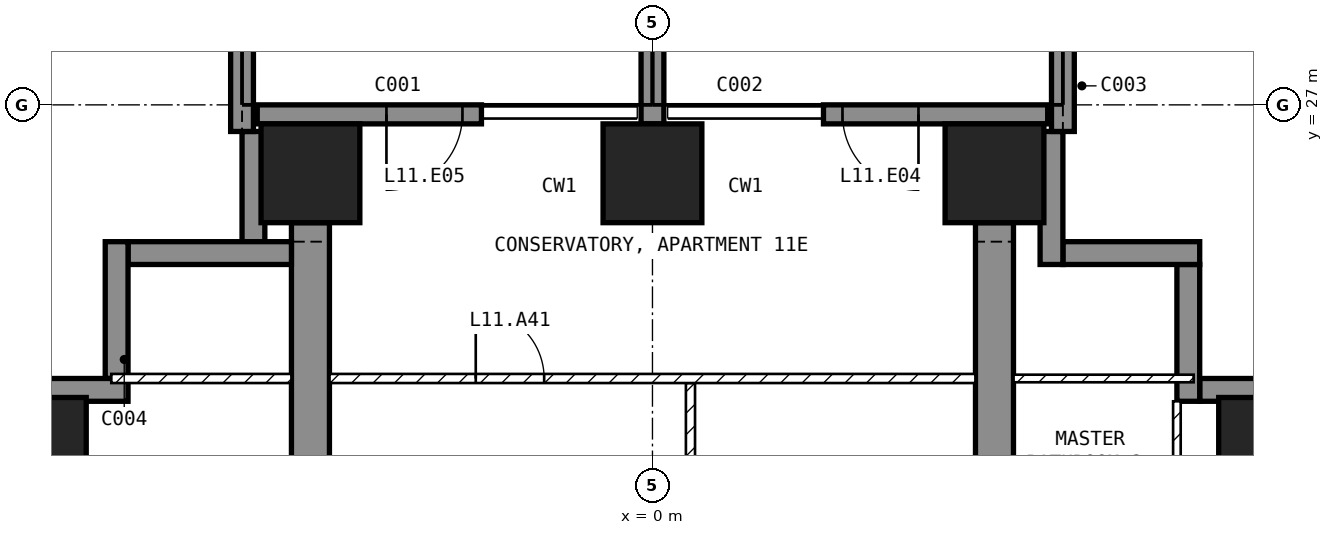
"""IFC4 building model, lengths in metres.
Left out: names, types, materials, properties, quantities, classifications, styles, units other than length and angle.
Written with IfcOpenShell. Run it as: python <this file> out.ifc"""

import sys

from ifc_helpers import new_model, si_unit, direction, frame, frame_2d, origin, origin_2d, place, context, subcontext, project, spatial, polyline, rectangle, outline, extrude, element, fill, save


model = new_model("IFC4")
c1 = context("Model", 3, precision=1e-05, world=origin(), true_north=direction((0.0, 1.0)))
c2 = subcontext(c1, "Body", "Model", "MODEL_VIEW")
j1 = project(units=[si_unit("LENGTHUNIT", "METRE"), si_unit("PLANEANGLEUNIT", "RADIAN")], contexts=[c1])
p1 = place(None, origin())
s1 = spatial("IfcSite", under=j1, at=p1, CompositionType="ELEMENT")
p2 = place(p1, origin())
s2 = spatial("IfcBuilding", under=s1, at=p2, CompositionType="ELEMENT")
p3 = place(p2, frame((0.0, 0.0, 57.5)))
s3 = spatial("IfcBuildingStorey", under=s2, at=p3, CompositionType="ELEMENT", Elevation=57.5)
for number, where, z_axis, x_axis in (
    (1, (-8.1, 22.5, -0.25), (0.0, 0.0, 1.0), (1.0, 0.0, 0.0)),
    (2, (-4.5, 26.1, -0.25), (0.0, 0.0, 1.0), (1.0, 0.0, 0.0)),
    (3, (0.0, 26.1, -0.25), (0.0, 0.0, 1.0), (1.0, 0.0, 0.0)),
    (4, (4.5, 26.1, -0.25), (0.0, 0.0, 1.0), (1.0, 0.0, 0.0)),
    (5, (8.1, 22.5, -0.25), (0.0, 0.0, 1.0), (1.0, 0.0, 0.0)),
):
    element("IfcColumn", number, at=place(p3, frame(where, z_axis=z_axis, x_axis=x_axis)), inside=s3, PredefinedType="COLUMN", context=c2, shape_type="SweptSolid", body=[
        extrude(rectangle(XDim=1.3, YDim=1.3, at=origin_2d()), origin(), (0.0, 0.0, 1.0), 3.5),
    ])
for number, where, z_axis, x_axis in (
    (6, (-4.75, 9.0, -0.25), (1.0, 0.0, 0.0), (0.0, 1.0, 0.0)),
    (7, (4.25, 9.0, -0.25), (1.0, 0.0, 0.0), (0.0, 1.0, 0.0)),
):
    element("IfcWall", number, at=place(p3, frame(where, z_axis=z_axis, x_axis=x_axis)), inside=s3, PredefinedType="SHEAR", context=c2, shape_type="SweptSolid", body=[
        extrude(outline(polyline([(0.0, 0.0), (2.1, 0.0), (2.1, 2.65), (4.5, 2.65), (4.5, 0.0), (9.9, 0.0), (9.9, 2.65), (12.3, 2.65), (12.3, 0.0), (16.45, 0.0), (16.45, 3.5), (0.0, 3.5), (0.0, 0.0)])), origin(), (0.0, 0.0, 1.0), 0.5),
    ])
p4 = place(p3, frame((5.2, 26.875, 0.0), z_axis=(0.0, 0.0, 1.0), x_axis=(-1.0, 0.0, 0.0)))
e8 = element("IfcWall", 8, at=p4, inside=s3, PredefinedType="SOLIDWALL", context=c2, shape_type="SweptSolid", body=[
    extrude(rectangle(XDim=2.95, YDim=0.25, at=frame_2d((1.475, 0.0))), origin(), (0.0, 0.0, 1.0), 3.25),
])
p5 = place(p4, frame((1.7, 0.0, 0.0)))
e9 = element("IfcOpeningElement", 9, at=p5, cuts=e8, PredefinedType="OPENING", context=c2, shape_type="SweptSolid", body=[
    extrude(rectangle(XDim=1.0, YDim=2.4, at=frame_2d((0.5, 1.2))), frame((0.0, 0.135, 0.0), z_axis=(0.0, -1.0, 0.0), x_axis=(1.0, 0.0, 0.0)), (0.0, 0.0, 1.0), 0.27),
])
p6 = place(p3, frame((-2.25, 26.875, 0.0), z_axis=(0.0, 0.0, 1.0), x_axis=(-1.0, 0.0, 0.0)))
e10 = element("IfcWall", 10, at=p6, inside=s3, PredefinedType="SOLIDWALL", context=c2, shape_type="SweptSolid", body=[
    extrude(rectangle(XDim=2.95, YDim=0.25, at=frame_2d((1.475, 0.0))), origin(), (0.0, 0.0, 1.0), 3.25),
])
p7 = place(p6, frame((0.25, 0.0, 0.0)))
e11 = element("IfcOpeningElement", 11, at=p7, cuts=e10, PredefinedType="OPENING", context=c2, shape_type="SweptSolid", body=[
    extrude(rectangle(XDim=1.0, YDim=2.4, at=frame_2d((0.5, 1.2))), frame((0.0, 0.135, 0.0), z_axis=(0.0, -1.0, 0.0), x_axis=(1.0, 0.0, 0.0)), (0.0, 0.0, 1.0), 0.27),
])
p8 = place(p3, frame((8.65, 23.25, 0.0), z_axis=(0.0, 0.0, 1.0), x_axis=(-1.0, 0.0, 0.0)))
e12 = element("IfcWall", 12, at=p8, inside=s3, PredefinedType="SOLIDWALL", context=c2, shape_type="SweptSolid", body=[
    extrude(rectangle(XDim=1.45, YDim=0.3, at=frame_2d((0.725, 0.0))), origin(), (0.0, 0.0, 1.0), 3.25),
])
p9 = place(p3, frame((7.05, 23.1, 0.0), z_axis=(0.0, 0.0, 1.0), x_axis=(0.0, 1.0, 0.0)))
e13 = element("IfcWall", 13, at=p9, inside=s3, PredefinedType="SOLIDWALL", context=c2, shape_type="SweptSolid", body=[
    extrude(rectangle(XDim=1.8, YDim=0.3, at=frame_2d((0.9, 0.0))), origin(), (0.0, 0.0, 1.0), 3.25),
])
p10 = place(p3, frame((7.2, 25.05, 0.0), z_axis=(0.0, 0.0, 1.0), x_axis=(-1.0, 0.0, 0.0)))
e14 = element("IfcWall", 14, at=p10, inside=s3, PredefinedType="SOLIDWALL", context=c2, shape_type="SweptSolid", body=[
    extrude(rectangle(XDim=1.8, YDim=0.3, at=frame_2d((0.9, 0.0))), origin(), (0.0, 0.0, 1.0), 3.25),
])
p11 = place(p3, frame((5.25, 24.9, 0.0), z_axis=(0.0, 0.0, 1.0), x_axis=(0.0, 1.0, 0.0)))
e15 = element("IfcWall", 15, at=p11, inside=s3, PredefinedType="SOLIDWALL", context=c2, shape_type="SweptSolid", body=[
    extrude(rectangle(XDim=1.75, YDim=0.3, at=frame_2d((0.875, 0.0))), origin(), (0.0, 0.0, 1.0), 3.25),
])
p12 = place(p3, frame((-5.25, 26.65, 0.0), z_axis=(0.0, 0.0, 1.0), x_axis=(0.0, -1.0, 0.0)))
e16 = element("IfcWall", 16, at=p12, inside=s3, PredefinedType="SOLIDWALL", context=c2, shape_type="SweptSolid", body=[
    extrude(rectangle(XDim=1.45, YDim=0.3, at=frame_2d((0.725, 0.0))), origin(), (0.0, 0.0, 1.0), 3.25),
])
p13 = place(p3, frame((-4.75, 25.05, 0.0), z_axis=(0.0, 0.0, 1.0), x_axis=(-1.0, 0.0, 0.0)))
e17 = element("IfcWall", 17, at=p13, inside=s3, PredefinedType="SOLIDWALL", context=c2, shape_type="SweptSolid", body=[
    extrude(rectangle(XDim=2.15, YDim=0.3, at=frame_2d((1.075, 0.0))), origin(), (0.0, 0.0, 1.0), 3.25),
])
p14 = place(p3, frame((-7.05, 25.2, 0.0), z_axis=(0.0, 0.0, 1.0), x_axis=(0.0, -1.0, 0.0)))
e18 = element("IfcWall", 18, at=p14, inside=s3, PredefinedType="SOLIDWALL", context=c2, shape_type="SweptSolid", body=[
    extrude(rectangle(XDim=1.8, YDim=0.3, at=frame_2d((0.9, 0.0))), origin(), (0.0, 0.0, 1.0), 3.25),
])
p15 = place(p3, frame((-6.9, 23.25, 0.0), z_axis=(0.0, 0.0, 1.0), x_axis=(-1.0, 0.0, 0.0)))
e19 = element("IfcWall", 19, at=p15, inside=s3, PredefinedType="SOLIDWALL", context=c2, shape_type="SweptSolid", body=[
    extrude(rectangle(XDim=1.75, YDim=0.3, at=frame_2d((0.875, 0.0))), origin(), (0.0, 0.0, 1.0), 3.25),
])
p16 = place(p3, frame((-5.4, 26.65, 0.0), z_axis=(0.0, 0.0, 1.0), x_axis=(0.0, 1.0, 0.0)))
e20 = element("IfcWall", 20, at=p16, inside=s3, PredefinedType="SOLIDWALL", context=c2, shape_type="SweptSolid", body=[
    extrude(rectangle(XDim=3.05, YDim=0.3, at=frame_2d((1.525, 0.0))), origin(), (0.0, 0.0, 1.0), 3.25),
])
p17 = place(p3, frame((0.0, 26.75, 0.0), z_axis=(0.0, 0.0, 1.0), x_axis=(0.0, 1.0, 0.0)))
e21 = element("IfcWall", 21, at=p17, inside=s3, PredefinedType="SOLIDWALL", context=c2, shape_type="SweptSolid", body=[
    extrude(rectangle(XDim=2.95, YDim=0.3, at=frame_2d((1.475, 0.0))), origin(), (0.0, 0.0, 1.0), 3.25),
])
p18 = place(p3, frame((5.4, 26.65, 0.0), z_axis=(0.0, 0.0, 1.0), x_axis=(0.0, 1.0, 0.0)))
e22 = element("IfcWall", 22, at=p18, inside=s3, PredefinedType="SOLIDWALL", context=c2, shape_type="SweptSolid", body=[
    extrude(rectangle(XDim=3.05, YDim=0.3, at=frame_2d((1.525, 0.0))), origin(), (0.0, 0.0, 1.0), 3.25),
])
p19 = place(p3, frame((0.5, 23.34, 0.0), z_axis=(0.0, 0.0, 1.0), x_axis=(0.0, -1.0, 0.0)))
e23 = element("IfcWall", 23, at=p19, inside=s3, PredefinedType="PARTITIONING", context=c2, shape_type="SweptSolid", body=[
    extrude(rectangle(XDim=4.38, YDim=0.12, at=frame_2d((2.19, 0.0))), origin(), (0.0, 0.0, 1.0), 3.25),
])
p20 = place(p19, frame((1.74, 0.0, 0.0)))
e24 = element("IfcOpeningElement", 24, at=p20, cuts=e23, PredefinedType="OPENING", context=c2, shape_type="SweptSolid", body=[
    extrude(rectangle(XDim=0.9, YDim=2.1, at=frame_2d((0.45, 1.05))), frame((0.0, 0.07, 0.0), z_axis=(0.0, -1.0, 0.0), x_axis=(1.0, 0.0, 0.0)), (0.0, 0.0, 1.0), 0.14),
])
p21 = place(p3, frame((-4.25, 23.4, 0.0), z_axis=(0.0, 0.0, 1.0), x_axis=(1.0, 0.0, 0.0)))
e25 = element("IfcWall", 25, at=p21, inside=s3, PredefinedType="PARTITIONING", context=c2, shape_type="SweptSolid", body=[
    extrude(rectangle(XDim=8.5, YDim=0.12, at=frame_2d((4.25, 0.0))), origin(), (0.0, 0.0, 1.0), 3.25),
])
p22 = place(p21, frame((1.925, 0.0, 0.0)))
e26 = element("IfcOpeningElement", 26, at=p22, cuts=e25, PredefinedType="OPENING", context=c2, shape_type="SweptSolid", body=[
    extrude(rectangle(XDim=0.9, YDim=2.1, at=frame_2d((0.45, 1.05))), frame((0.0, 0.07, 0.0), z_axis=(0.0, -1.0, 0.0), x_axis=(1.0, 0.0, 0.0)), (0.0, 0.0, 1.0), 0.14),
])
p23 = place(p3, frame((6.9, 20.45, 0.0), z_axis=(0.0, 0.0, 1.0), x_axis=(0.0, 1.0, 0.0)))
e27 = element("IfcWall", 27, at=p23, inside=s3, PredefinedType="PARTITIONING", context=c2, shape_type="SweptSolid", body=[
    extrude(rectangle(XDim=2.65, YDim=0.1, at=frame_2d((1.325, 0.0))), origin(), (0.0, 0.0, 1.0), 3.25),
])
p24 = place(p3, frame((4.75, 23.4, 0.0), z_axis=(0.0, 0.0, 1.0), x_axis=(1.0, 0.0, 0.0)))
e28 = element("IfcWall", 28, at=p24, inside=s3, PredefinedType="PARTITIONING", context=c2, shape_type="SweptSolid", body=[
    extrude(rectangle(XDim=2.37, YDim=0.1, at=frame_2d((1.185, 0.0))), origin(), (0.0, 0.0, 1.0), 3.25),
])
p25 = place(p3, frame((-7.12, 23.4, 0.0), z_axis=(0.0, 0.0, 1.0), x_axis=(1.0, 0.0, 0.0)))
e29 = element("IfcWall", 29, at=p25, inside=s3, PredefinedType="PARTITIONING", context=c2, shape_type="SweptSolid", body=[
    extrude(rectangle(XDim=2.37, YDim=0.12, at=frame_2d((1.185, 0.0))), origin(), (0.0, 0.0, 1.0), 3.25),
])
p26 = place(p5, origin())
e30 = element("IfcDoor", 30, at=p26, inside=s3, OperationType="SINGLE_SWING_LEFT", PredefinedType="DOOR", context=c2, shape_type="SweptSolid", body=[
    extrude(rectangle(XDim=1.0, YDim=2.4, at=frame_2d((0.5, 1.2))), frame((0.0, 0.025, 0.0), z_axis=(0.0, -1.0, 0.0), x_axis=(1.0, 0.0, 0.0)), (0.0, 0.0, 1.0), 0.05),
])
fill(e9, e30)
p27 = place(p7, origin())
e31 = element("IfcDoor", 31, at=p27, inside=s3, OperationType="SINGLE_SWING_RIGHT", PredefinedType="DOOR", context=c2, shape_type="SweptSolid", body=[
    extrude(rectangle(XDim=1.0, YDim=2.4, at=frame_2d((0.5, 1.2))), frame((0.0, 0.025, 0.0), z_axis=(0.0, -1.0, 0.0), x_axis=(1.0, 0.0, 0.0)), (0.0, 0.0, 1.0), 0.05),
])
fill(e11, e31)
p28 = place(p22, origin())
e32 = element("IfcDoor", 32, at=p28, inside=s3, OperationType="SINGLE_SWING_LEFT", PredefinedType="DOOR", context=c2, shape_type="SweptSolid", body=[
    extrude(rectangle(XDim=0.9, YDim=2.1, at=frame_2d((0.45, 1.05))), frame((0.0, 0.025, 0.0), z_axis=(0.0, -1.0, 0.0), x_axis=(1.0, 0.0, 0.0)), (0.0, 0.0, 1.0), 0.05),
])
fill(e26, e32)
save(model, sys.argv[1])
